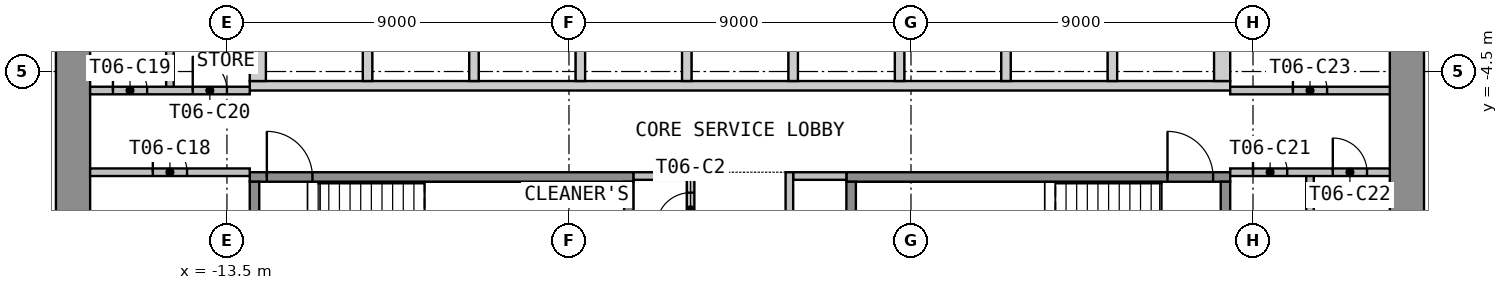
"""IFC4 building model, lengths in metres.
Left out: names, types, materials, properties, quantities, classifications, styles, units other than length and angle.
Written with IfcOpenShell. Run it as: python <this file> out.ifc"""

import sys

from ifc_helpers import new_model, si_unit, direction, frame, frame_2d, origin, place, context, subcontext, project, spatial, polyline, rectangle, outline, extrude, element, fill, save


model = new_model("IFC4")
c1 = context("Model", 3, precision=1e-05, world=origin(), true_north=direction((0.0, 1.0)))
c2 = subcontext(c1, "Body", "Model", "MODEL_VIEW")
j1 = project(units=[si_unit("LENGTHUNIT", "METRE"), si_unit("PLANEANGLEUNIT", "RADIAN")], contexts=[c1])
p1 = place(None, origin())
s1 = spatial("IfcSite", under=j1, at=p1, CompositionType="ELEMENT")
p2 = place(p1, origin())
s2 = spatial("IfcBuilding", under=s1, at=p2, CompositionType="ELEMENT")
p3 = place(p2, frame((0.0, 0.0, 93.0)))
s3 = spatial("IfcBuildingStorey", under=s2, at=p3, CompositionType="ELEMENT", Elevation=93.0)
p4 = place(p3, frame((-17.55, -12.6, 0.0), z_axis=(0.0, 0.0, 1.0), x_axis=(0.0, 1.0, 0.0)))
e1 = element("IfcWall", 1, at=p4, inside=s3, PredefinedType="SHEAR", context=c2, shape_type="SweptSolid", body=[
    extrude(rectangle(XDim=25.2, YDim=0.9, at=frame_2d((12.6, 0.0))), origin(), (0.0, 0.0, 1.0), 3.525),
])
p5 = place(p4, frame((11.4, 0.0, 0.0)))
e2 = element("IfcOpeningElement", 2, at=p5, cuts=e1, PredefinedType="OPENING", context=c2, shape_type="SweptSolid", body=[
    extrude(rectangle(XDim=2.4, YDim=2.1, at=frame_2d((1.2, 1.05))), frame((0.0, 0.46, 0.0), z_axis=(0.0, -1.0, 0.0), x_axis=(1.0, 0.0, 0.0)), (0.0, 0.0, 1.0), 0.92),
])
p6 = place(p3, frame((17.55, -12.6, 0.0), z_axis=(0.0, 0.0, 1.0), x_axis=(0.0, 1.0, 0.0)))
e3 = element("IfcWall", 3, at=p6, inside=s3, PredefinedType="SHEAR", context=c2, shape_type="SweptSolid", body=[
    extrude(rectangle(XDim=25.2, YDim=0.9, at=frame_2d((12.6, 0.0))), origin(), (0.0, 0.0, 1.0), 3.525),
])
p7 = place(p6, frame((11.4, 0.0, 0.0)))
e4 = element("IfcOpeningElement", 4, at=p7, cuts=e3, PredefinedType="OPENING", context=c2, shape_type="SweptSolid", body=[
    extrude(rectangle(XDim=2.4, YDim=2.1, at=frame_2d((1.2, 1.05))), frame((0.0, 0.46, 0.0), z_axis=(0.0, -1.0, 0.0), x_axis=(1.0, 0.0, 0.0)), (0.0, 0.0, 1.0), 0.92),
])
p8 = place(p3, origin())
e5 = element("IfcWall", 5, at=p8, inside=s3, PredefinedType="SHEAR", context=c2, shape_type="SweptSolid", body=[
    extrude(outline(polyline([(-12.9, -5.0), (12.9, -5.0), (12.9, -4.75), (-12.9, -4.75), (-12.9, -5.0)])), origin(), (0.0, 0.0, 1.0), 3.525),
])
p9 = place(p3, origin())
e6 = element("IfcWall", 6, at=p9, inside=s3, PredefinedType="SHEAR", context=c2, shape_type="SweptSolid", body=[
    extrude(outline(polyline([(-12.9, -4.75), (-12.475, -4.75), (-12.475, -2.05), (-12.9, -2.05), (-12.9, -4.75)])), origin(), (0.0, 0.0, 1.0), 3.525),
])
p10 = place(p3, origin())
e7 = element("IfcWall", 7, at=p10, inside=s3, PredefinedType="SHEAR", context=c2, shape_type="SweptSolid", body=[
    extrude(outline(polyline([(-9.925, -4.75), (-9.675, -4.75), (-9.675, -2.05), (-9.925, -2.05), (-9.925, -4.75)])), origin(), (0.0, 0.0, 1.0), 3.525),
])
p11 = place(p3, origin())
e8 = element("IfcWall", 8, at=p11, inside=s3, PredefinedType="SHEAR", context=c2, shape_type="SweptSolid", body=[
    extrude(outline(polyline([(-7.125, -4.75), (-6.875, -4.75), (-6.875, -2.05), (-7.125, -2.05), (-7.125, -4.75)])), origin(), (0.0, 0.0, 1.0), 3.525),
])
p12 = place(p3, origin())
e9 = element("IfcWall", 9, at=p12, inside=s3, PredefinedType="SHEAR", context=c2, shape_type="SweptSolid", body=[
    extrude(outline(polyline([(-4.325, -4.75), (-4.075, -4.75), (-4.075, -2.05), (-4.325, -2.05), (-4.325, -4.75)])), origin(), (0.0, 0.0, 1.0), 3.525),
])
p13 = place(p3, origin())
e10 = element("IfcWall", 10, at=p13, inside=s3, PredefinedType="SHEAR", context=c2, shape_type="SweptSolid", body=[
    extrude(outline(polyline([(-1.525, -4.75), (-1.275, -4.75), (-1.275, -2.05), (-1.525, -2.05), (-1.525, -4.75)])), origin(), (0.0, 0.0, 1.0), 3.525),
])
p14 = place(p3, origin())
e11 = element("IfcWall", 11, at=p14, inside=s3, PredefinedType="SHEAR", context=c2, shape_type="SweptSolid", body=[
    extrude(outline(polyline([(1.275, -4.75), (1.525, -4.75), (1.525, -2.05), (1.275, -2.05), (1.275, -4.75)])), origin(), (0.0, 0.0, 1.0), 3.525),
])
p15 = place(p3, origin())
e12 = element("IfcWall", 12, at=p15, inside=s3, PredefinedType="SHEAR", context=c2, shape_type="SweptSolid", body=[
    extrude(outline(polyline([(4.075, -4.75), (4.325, -4.75), (4.325, -2.05), (4.075, -2.05), (4.075, -4.75)])), origin(), (0.0, 0.0, 1.0), 3.525),
])
p16 = place(p3, origin())
e13 = element("IfcWall", 13, at=p16, inside=s3, PredefinedType="SHEAR", context=c2, shape_type="SweptSolid", body=[
    extrude(outline(polyline([(6.875, -4.75), (7.125, -4.75), (7.125, -2.05), (6.875, -2.05), (6.875, -4.75)])), origin(), (0.0, 0.0, 1.0), 3.525),
])
p17 = place(p3, origin())
e14 = element("IfcWall", 14, at=p17, inside=s3, PredefinedType="SHEAR", context=c2, shape_type="SweptSolid", body=[
    extrude(outline(polyline([(9.675, -4.75), (9.925, -4.75), (9.925, -2.05), (9.675, -2.05), (9.675, -4.75)])), origin(), (0.0, 0.0, 1.0), 3.525),
])
p18 = place(p3, origin())
e15 = element("IfcWall", 15, at=p18, inside=s3, PredefinedType="SHEAR", context=c2, shape_type="SweptSolid", body=[
    extrude(outline(polyline([(12.475, -4.75), (12.9, -4.75), (12.9, -2.05), (12.475, -2.05), (12.475, -4.75)])), origin(), (0.0, 0.0, 1.0), 3.525),
])
p19 = place(p3, frame((-12.9, -7.275, 0.0), z_axis=(0.0, 0.0, 1.0), x_axis=(1.0, 0.0, 0.0)))
e16 = element("IfcWall", 16, at=p19, inside=s3, PredefinedType="SHEAR", context=c2, shape_type="SweptSolid", body=[
    extrude(rectangle(XDim=10.1, YDim=0.25, at=frame_2d((5.05, 0.0))), origin(), (0.0, 0.0, 1.0), 3.525),
])
p20 = place(p19, frame((0.45, 0.0, 0.0)))
e17 = element("IfcOpeningElement", 17, at=p20, cuts=e16, PredefinedType="OPENING", context=c2, shape_type="SweptSolid", body=[
    extrude(rectangle(XDim=1.2, YDim=2.1, at=frame_2d((0.6, 1.05))), frame((0.0, 0.135, 0.0), z_axis=(0.0, -1.0, 0.0), x_axis=(1.0, 0.0, 0.0)), (0.0, 0.0, 1.0), 0.27),
])
for number, where, z_axis, x_axis in (
    (18, (-12.775, -10.65, 0.0), (0.0, 0.0, 1.0), (0.0, 1.0, 0.0)),
    (19, (-2.925, -10.65, 0.0), (0.0, 0.0, 1.0), (0.0, 1.0, 0.0)),
):
    element("IfcWall", number, at=place(p3, frame(where, z_axis=z_axis, x_axis=x_axis)), inside=s3, PredefinedType="SHEAR", context=c2, shape_type="SweptSolid", body=[
        extrude(rectangle(XDim=3.25, YDim=0.25, at=frame_2d((1.625, 0.0))), origin(), (0.0, 0.0, 1.0), 3.525),
    ])
p21 = place(p3, frame((2.8, -7.275, 0.0), z_axis=(0.0, 0.0, 1.0), x_axis=(1.0, 0.0, 0.0)))
e20 = element("IfcWall", 20, at=p21, inside=s3, PredefinedType="SHEAR", context=c2, shape_type="SweptSolid", body=[
    extrude(rectangle(XDim=10.1, YDim=0.25, at=frame_2d((5.05, 0.0))), origin(), (0.0, 0.0, 1.0), 3.525),
])
p22 = place(p21, frame((8.45, 0.0, 0.0)))
e21 = element("IfcOpeningElement", 21, at=p22, cuts=e20, PredefinedType="OPENING", context=c2, shape_type="SweptSolid", body=[
    extrude(rectangle(XDim=1.2, YDim=2.1, at=frame_2d((0.6, 1.05))), frame((0.0, 0.135, 0.0), z_axis=(0.0, -1.0, 0.0), x_axis=(1.0, 0.0, 0.0)), (0.0, 0.0, 1.0), 0.27),
])
for number, where, z_axis, x_axis in (
    (22, (2.925, -10.65, 0.0), (0.0, 0.0, 1.0), (0.0, 1.0, 0.0)),
    (23, (12.775, -10.65, 0.0), (0.0, 0.0, 1.0), (0.0, 1.0, 0.0)),
):
    element("IfcWall", number, at=place(p3, frame(where, z_axis=z_axis, x_axis=x_axis)), inside=s3, PredefinedType="SHEAR", context=c2, shape_type="SweptSolid", body=[
        extrude(rectangle(XDim=3.25, YDim=0.25, at=frame_2d((1.625, 0.0))), origin(), (0.0, 0.0, 1.0), 3.525),
    ])
for number, where, z_axis, x_axis in (
    (24, (-2.8, -7.25, 0.0), (0.0, 0.0, 1.0), (1.0, 0.0, 0.0)),
    (25, (1.4, -7.25, 0.0), (0.0, 0.0, 1.0), (1.0, 0.0, 0.0)),
):
    element("IfcWall", number, at=place(p3, frame(where, z_axis=z_axis, x_axis=x_axis)), inside=s3, PredefinedType="PARTITIONING", context=c2, shape_type="SweptSolid", body=[
        extrude(rectangle(XDim=1.4, YDim=0.2, at=frame_2d((0.7, 0.0))), origin(), (0.0, 0.0, 1.0), 3.525),
    ])
p23 = place(p3, frame((-1.3, -12.6, 0.0), z_axis=(0.0, 0.0, 1.0), x_axis=(0.0, 1.0, 0.0)))
e26 = element("IfcWall", 26, at=p23, inside=s3, PredefinedType="PARTITIONING", context=c2, shape_type="SweptSolid", body=[
    extrude(rectangle(XDim=5.45, YDim=0.2, at=frame_2d((2.725, 0.0))), origin(), (0.0, 0.0, 1.0), 3.525),
])
p24 = place(p23, frame((1.387, 0.0, 0.0)))
e27 = element("IfcOpeningElement", 27, at=p24, cuts=e26, PredefinedType="OPENING", context=c2, shape_type="SweptSolid", body=[
    extrude(rectangle(XDim=0.9, YDim=2.1, at=frame_2d((0.45, 1.05))), frame((0.0, 0.11, 0.0), z_axis=(0.0, -1.0, 0.0), x_axis=(1.0, 0.0, 0.0)), (0.0, 0.0, 1.0), 0.22),
])
p25 = place(p23, frame((4.012, 0.0, 0.0)))
e28 = element("IfcOpeningElement", 28, at=p25, cuts=e26, PredefinedType="OPENING", context=c2, shape_type="SweptSolid", body=[
    extrude(rectangle(XDim=0.9, YDim=2.1, at=frame_2d((0.45, 1.05))), frame((0.0, 0.11, 0.0), z_axis=(0.0, -1.0, 0.0), x_axis=(1.0, 0.0, 0.0)), (0.0, 0.0, 1.0), 0.22),
])
p26 = place(p3, frame((1.3, -12.6, 0.0), z_axis=(0.0, 0.0, 1.0), x_axis=(0.0, 1.0, 0.0)))
e29 = element("IfcWall", 29, at=p26, inside=s3, PredefinedType="PARTITIONING", context=c2, shape_type="SweptSolid", body=[
    extrude(rectangle(XDim=5.45, YDim=0.2, at=frame_2d((2.725, 0.0))), origin(), (0.0, 0.0, 1.0), 3.525),
])
p27 = place(p26, frame((2.175, 0.0, 0.0)))
e30 = element("IfcOpeningElement", 30, at=p27, cuts=e29, PredefinedType="OPENING", context=c2, shape_type="SweptSolid", body=[
    extrude(rectangle(XDim=0.9, YDim=2.1, at=frame_2d((0.45, 1.05))), frame((0.0, 0.11, 0.0), z_axis=(0.0, -1.0, 0.0), x_axis=(1.0, 0.0, 0.0)), (0.0, 0.0, 1.0), 0.22),
])
p28 = place(p3, frame((-17.1, -7.15, 0.0), z_axis=(0.0, 0.0, 1.0), x_axis=(1.0, 0.0, 0.0)))
e31 = element("IfcWall", 31, at=p28, inside=s3, PredefinedType="PARTITIONING", context=c2, shape_type="SweptSolid", body=[
    extrude(rectangle(XDim=4.2, YDim=0.2, at=frame_2d((2.1, 0.0))), origin(), (0.0, 0.0, 1.0), 3.525),
])
p29 = place(p28, frame((1.65, 0.0, 0.0)))
e32 = element("IfcOpeningElement", 32, at=p29, cuts=e31, PredefinedType="OPENING", context=c2, shape_type="SweptSolid", body=[
    extrude(rectangle(XDim=0.9, YDim=2.1, at=frame_2d((0.45, 1.05))), frame((0.0, 0.11, 0.0), z_axis=(0.0, -1.0, 0.0), x_axis=(1.0, 0.0, 0.0)), (0.0, 0.0, 1.0), 0.22),
])
p30 = place(p3, frame((-15.0, -5.0, 0.0), z_axis=(0.0, 0.0, 1.0), x_axis=(0.0, 1.0, 0.0)))
e33 = element("IfcWall", 33, at=p30, inside=s3, PredefinedType="PARTITIONING", context=c2, shape_type="SweptSolid", body=[
    extrude(rectangle(XDim=3.2, YDim=0.2, at=frame_2d((1.6, 0.0))), origin(), (0.0, 0.0, 1.0), 3.525),
])
p31 = place(p3, frame((-17.1, -5.0, 0.0), z_axis=(0.0, 0.0, 1.0), x_axis=(1.0, 0.0, 0.0)))
e34 = element("IfcWall", 34, at=p31, inside=s3, PredefinedType="PARTITIONING", context=c2, shape_type="SweptSolid", body=[
    extrude(rectangle(XDim=4.2, YDim=0.2, at=frame_2d((2.1, 0.0))), origin(), (0.0, 0.0, 1.0), 3.525),
])
p32 = place(p31, frame((0.6, 0.0, 0.0)))
e35 = element("IfcOpeningElement", 35, at=p32, cuts=e34, PredefinedType="OPENING", context=c2, shape_type="SweptSolid", body=[
    extrude(rectangle(XDim=0.9, YDim=2.1, at=frame_2d((0.45, 1.05))), frame((0.0, 0.11, 0.0), z_axis=(0.0, -1.0, 0.0), x_axis=(1.0, 0.0, 0.0)), (0.0, 0.0, 1.0), 0.22),
])
p33 = place(p31, frame((2.7, 0.0, 0.0)))
e36 = element("IfcOpeningElement", 36, at=p33, cuts=e34, PredefinedType="OPENING", context=c2, shape_type="SweptSolid", body=[
    extrude(rectangle(XDim=0.9, YDim=2.1, at=frame_2d((0.45, 1.05))), frame((0.0, 0.11, 0.0), z_axis=(0.0, -1.0, 0.0), x_axis=(1.0, 0.0, 0.0)), (0.0, 0.0, 1.0), 0.22),
])
p34 = place(p3, frame((15.0, -12.6, 0.0), z_axis=(0.0, 0.0, 1.0), x_axis=(0.0, 1.0, 0.0)))
e37 = element("IfcWall", 37, at=p34, inside=s3, PredefinedType="PARTITIONING", context=c2, shape_type="SweptSolid", body=[
    extrude(rectangle(XDim=5.45, YDim=0.2, at=frame_2d((2.725, 0.0))), origin(), (0.0, 0.0, 1.0), 3.525),
])
p35 = place(p3, frame((12.9, -7.15, 0.0), z_axis=(0.0, 0.0, 1.0), x_axis=(1.0, 0.0, 0.0)))
e38 = element("IfcWall", 38, at=p35, inside=s3, PredefinedType="PARTITIONING", context=c2, shape_type="SweptSolid", body=[
    extrude(rectangle(XDim=4.2, YDim=0.2, at=frame_2d((2.1, 0.0))), origin(), (0.0, 0.0, 1.0), 3.525),
])
p36 = place(p35, frame((0.6, 0.0, 0.0)))
e39 = element("IfcOpeningElement", 39, at=p36, cuts=e38, PredefinedType="OPENING", context=c2, shape_type="SweptSolid", body=[
    extrude(rectangle(XDim=0.9, YDim=2.1, at=frame_2d((0.45, 1.05))), frame((0.0, 0.11, 0.0), z_axis=(0.0, -1.0, 0.0), x_axis=(1.0, 0.0, 0.0)), (0.0, 0.0, 1.0), 0.22),
])
p37 = place(p35, frame((2.7, 0.0, 0.0)))
e40 = element("IfcOpeningElement", 40, at=p37, cuts=e38, PredefinedType="OPENING", context=c2, shape_type="SweptSolid", body=[
    extrude(rectangle(XDim=0.9, YDim=2.1, at=frame_2d((0.45, 1.05))), frame((0.0, 0.11, 0.0), z_axis=(0.0, -1.0, 0.0), x_axis=(1.0, 0.0, 0.0)), (0.0, 0.0, 1.0), 0.22),
])
p38 = place(p3, frame((12.9, -5.0, 0.0), z_axis=(0.0, 0.0, 1.0), x_axis=(1.0, 0.0, 0.0)))
e41 = element("IfcWall", 41, at=p38, inside=s3, PredefinedType="PARTITIONING", context=c2, shape_type="SweptSolid", body=[
    extrude(rectangle(XDim=4.2, YDim=0.2, at=frame_2d((2.1, 0.0))), origin(), (0.0, 0.0, 1.0), 3.525),
])
p39 = place(p38, frame((1.65, 0.0, 0.0)))
e42 = element("IfcOpeningElement", 42, at=p39, cuts=e41, PredefinedType="OPENING", context=c2, shape_type="SweptSolid", body=[
    extrude(rectangle(XDim=0.9, YDim=2.1, at=frame_2d((0.45, 1.05))), frame((0.0, 0.11, 0.0), z_axis=(0.0, -1.0, 0.0), x_axis=(1.0, 0.0, 0.0)), (0.0, 0.0, 1.0), 0.22),
])
p40 = place(p20, origin())
e43 = element("IfcDoor", 43, at=p40, inside=s3, OperationType="SINGLE_SWING_LEFT", PredefinedType="DOOR", context=c2, shape_type="SweptSolid", body=[
    extrude(rectangle(XDim=1.2, YDim=2.1, at=frame_2d((0.6, 1.05))), frame((0.0, 0.025, 0.0), z_axis=(0.0, -1.0, 0.0), x_axis=(1.0, 0.0, 0.0)), (0.0, 0.0, 1.0), 0.05),
])
fill(e17, e43)
p41 = place(p22, origin())
e44 = element("IfcDoor", 44, at=p41, inside=s3, OperationType="SINGLE_SWING_LEFT", PredefinedType="DOOR", context=c2, shape_type="SweptSolid", body=[
    extrude(rectangle(XDim=1.2, YDim=2.1, at=frame_2d((0.6, 1.05))), frame((0.0, 0.025, 0.0), z_axis=(0.0, -1.0, 0.0), x_axis=(1.0, 0.0, 0.0)), (0.0, 0.0, 1.0), 0.05),
])
fill(e21, e44)
p42 = place(p25, origin())
e45 = element("IfcDoor", 45, at=p42, inside=s3, OperationType="SINGLE_SWING_LEFT", PredefinedType="DOOR", context=c2, shape_type="SweptSolid", body=[
    extrude(rectangle(XDim=0.9, YDim=2.1, at=frame_2d((0.45, 1.05))), frame((0.0, 0.025, 0.0), z_axis=(0.0, -1.0, 0.0), x_axis=(1.0, 0.0, 0.0)), (0.0, 0.0, 1.0), 0.05),
])
fill(e28, e45)
p43 = place(p29, origin())
e46 = element("IfcDoor", 46, at=p43, inside=s3, OperationType="SINGLE_SWING_LEFT", PredefinedType="DOOR", context=c2, shape_type="SweptSolid", body=[
    extrude(rectangle(XDim=0.9, YDim=2.1, at=frame_2d((0.45, 1.05))), frame((0.0, 0.025, 0.0), z_axis=(0.0, -1.0, 0.0), x_axis=(1.0, 0.0, 0.0)), (0.0, 0.0, 1.0), 0.05),
])
fill(e32, e46)
p44 = place(p32, origin())
e47 = element("IfcDoor", 47, at=p44, inside=s3, OperationType="SINGLE_SWING_LEFT", PredefinedType="DOOR", context=c2, shape_type="SweptSolid", body=[
    extrude(rectangle(XDim=0.9, YDim=2.1, at=frame_2d((0.45, 1.05))), frame((0.0, 0.025, 0.0), z_axis=(0.0, -1.0, 0.0), x_axis=(1.0, 0.0, 0.0)), (0.0, 0.0, 1.0), 0.05),
])
fill(e35, e47)
p45 = place(p33, origin())
e48 = element("IfcDoor", 48, at=p45, inside=s3, OperationType="SINGLE_SWING_LEFT", PredefinedType="DOOR", context=c2, shape_type="SweptSolid", body=[
    extrude(rectangle(XDim=0.9, YDim=2.1, at=frame_2d((0.45, 1.05))), frame((0.0, 0.025, 0.0), z_axis=(0.0, -1.0, 0.0), x_axis=(1.0, 0.0, 0.0)), (0.0, 0.0, 1.0), 0.05),
])
fill(e36, e48)
p46 = place(p36, origin())
e49 = element("IfcDoor", 49, at=p46, inside=s3, OperationType="SINGLE_SWING_LEFT", PredefinedType="DOOR", context=c2, shape_type="SweptSolid", body=[
    extrude(rectangle(XDim=0.9, YDim=2.1, at=frame_2d((0.45, 1.05))), frame((0.0, 0.025, 0.0), z_axis=(0.0, -1.0, 0.0), x_axis=(1.0, 0.0, 0.0)), (0.0, 0.0, 1.0), 0.05),
])
fill(e39, e49)
p47 = place(p37, origin())
e50 = element("IfcDoor", 50, at=p47, inside=s3, OperationType="SINGLE_SWING_LEFT", PredefinedType="DOOR", context=c2, shape_type="SweptSolid", body=[
    extrude(rectangle(XDim=0.9, YDim=2.1, at=frame_2d((0.45, 1.05))), frame((0.0, 0.025, 0.0), z_axis=(0.0, -1.0, 0.0), x_axis=(1.0, 0.0, 0.0)), (0.0, 0.0, 1.0), 0.05),
])
fill(e40, e50)
p48 = place(p39, origin())
e51 = element("IfcDoor", 51, at=p48, inside=s3, OperationType="SINGLE_SWING_LEFT", PredefinedType="DOOR", context=c2, shape_type="SweptSolid", body=[
    extrude(rectangle(XDim=0.9, YDim=2.1, at=frame_2d((0.45, 1.05))), frame((0.0, 0.025, 0.0), z_axis=(0.0, -1.0, 0.0), x_axis=(1.0, 0.0, 0.0)), (0.0, 0.0, 1.0), 0.05),
])
fill(e42, e51)
save(model, sys.argv[1])
